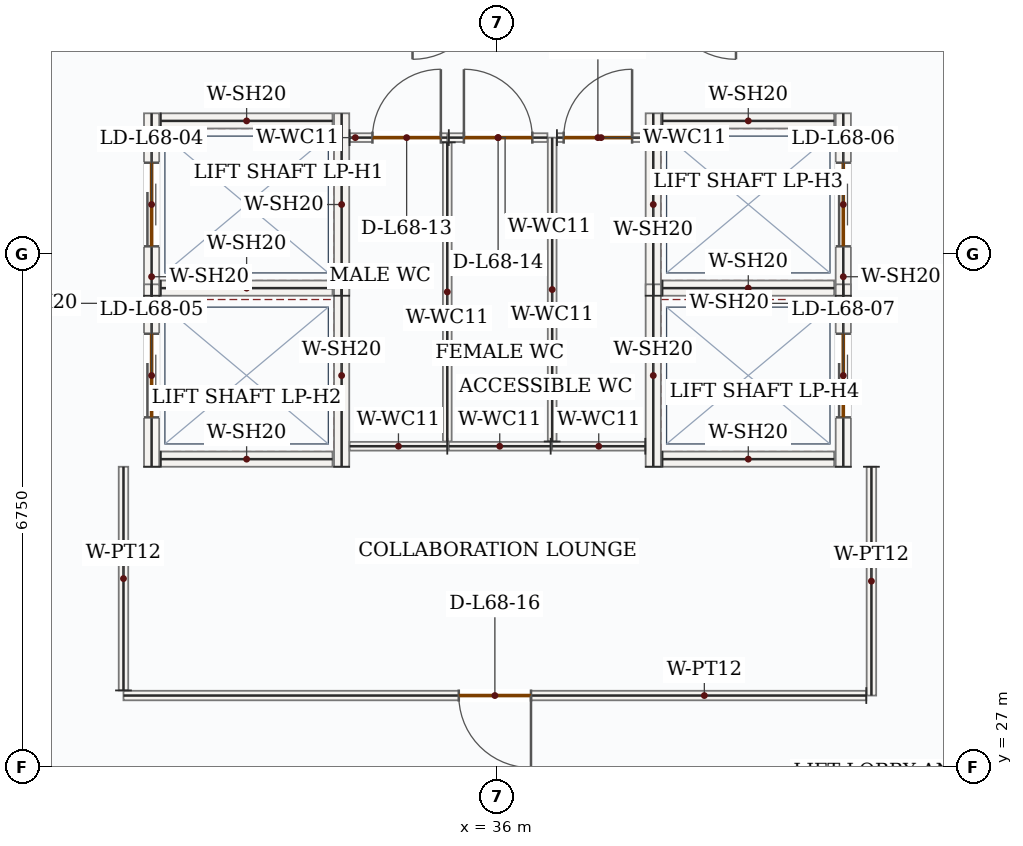
"""IFC4 building model, lengths in metres.
Left out: names, types, materials, properties, quantities, classifications, styles, units other than length and angle.
Written with IfcOpenShell. Run it as: python <this file> out.ifc"""

import sys

from ifc_helpers import new_model, si_unit, direction, frame, frame_2d, origin, place, context, subcontext, project, spatial, rectangle, extrude, source, transform, mapped, element, fill, save


model = new_model("IFC4")
c1 = context("Model", 3, precision=1e-05, world=origin(), true_north=direction((0.0, 1.0)))
c2 = subcontext(c1, "Body", "Model", "MODEL_VIEW")
j1 = project(units=[si_unit("LENGTHUNIT", "METRE"), si_unit("PLANEANGLEUNIT", "RADIAN")], contexts=[c1])
p1 = place(None, origin())
s1 = spatial("IfcSite", under=j1, at=p1, CompositionType="ELEMENT")
p2 = place(p1, origin())
s2 = spatial("IfcBuilding", under=s1, at=p2, CompositionType="ELEMENT")
p3 = place(p2, frame((0.0, 0.0, 284.1)))
s3 = spatial("IfcBuildingStorey", under=s2, at=p3, CompositionType="ELEMENT", Elevation=284.1)
p4 = place(p3, frame((31.45, 33.2, 0.0), z_axis=(0.0, 0.0, 1.0), x_axis=(0.0, 1.0, 0.0)))
e1 = element("IfcWall", 1, at=p4, inside=s3, PredefinedType="SOLIDWALL", context=c2, shape_type="SweptSolid", body=[
    extrude(rectangle(XDim=2.4, YDim=0.2, at=frame_2d((1.2, 0.0))), origin(), (0.0, 0.0, 1.0), 3.5),
])
p5 = place(p4, frame((0.65, 0.0, 0.0)))
e2 = element("IfcOpeningElement", 2, at=p5, cuts=e1, PredefinedType="OPENING", context=c2, shape_type="SweptSolid", body=[
    extrude(rectangle(XDim=1.1, YDim=2.15, at=frame_2d((0.55, 1.075))), frame((0.0, 0.11, 0.0), z_axis=(0.0, -1.0, 0.0), x_axis=(1.0, 0.0, 0.0)), (0.0, 0.0, 1.0), 0.22),
])
m1 = source(origin(), c2, "Body", "SweptSolid", [
    extrude(rectangle(XDim=2.4, YDim=0.2, at=frame_2d((1.2, 0.0))), origin(), (0.0, 0.0, 1.0), 3.5),
])
p6 = place(p3, frame((33.95, 33.2, 0.0), z_axis=(0.0, 0.0, 1.0), x_axis=(0.0, 1.0, 0.0)))
e3 = element("IfcWall", 3, at=p6, inside=s3, PredefinedType="SOLIDWALL", context=c2, shape_type="MappedRepresentation", body=[
    mapped(m1, transform((0.0, 0.0, 0.0), x_axis=(1.0, 0.0, 0.0), y_axis=(0.0, 1.0, 0.0), z_axis=(0.0, 0.0, 1.0), scale=1.0)),
])
m2 = source(origin(), c2, "Body", "SweptSolid", [
    extrude(rectangle(XDim=2.26, YDim=0.2, at=frame_2d((1.13, 0.0))), origin(), (0.0, 0.0, 1.0), 3.5),
])
for number, where, z_axis, x_axis in (
    (4, (31.57, 33.3, 0.0), (0.0, 0.0, 1.0), (1.0, 0.0, 0.0)),
    (5, (31.57, 35.5, 0.0), (0.0, 0.0, 1.0), (1.0, 0.0, 0.0)),
):
    element("IfcWall", number, at=place(p3, frame(where, z_axis=z_axis, x_axis=x_axis)), inside=s3, PredefinedType="SOLIDWALL", context=c2, shape_type="MappedRepresentation", body=[
        mapped(m2, transform((0.0, 0.0, 0.0), x_axis=(1.0, 0.0, 0.0), y_axis=(0.0, 1.0, 0.0), z_axis=(0.0, 0.0, 1.0), scale=1.0)),
    ])
p7 = place(p3, frame((31.45, 30.95, 0.0), z_axis=(0.0, 0.0, 1.0), x_axis=(0.0, 1.0, 0.0)))
e6 = element("IfcWall", 6, at=p7, inside=s3, PredefinedType="SOLIDWALL", context=c2, shape_type="SweptSolid", body=[
    extrude(rectangle(XDim=2.4, YDim=0.2, at=frame_2d((1.2, 0.0))), origin(), (0.0, 0.0, 1.0), 3.5),
])
p8 = place(p7, frame((0.65, 0.0, 0.0)))
e7 = element("IfcOpeningElement", 7, at=p8, cuts=e6, PredefinedType="OPENING", context=c2, shape_type="SweptSolid", body=[
    extrude(rectangle(XDim=1.1, YDim=2.15, at=frame_2d((0.55, 1.075))), frame((0.0, 0.11, 0.0), z_axis=(0.0, -1.0, 0.0), x_axis=(1.0, 0.0, 0.0)), (0.0, 0.0, 1.0), 0.22),
])
p9 = place(p3, frame((33.95, 30.95, 0.0), z_axis=(0.0, 0.0, 1.0), x_axis=(0.0, 1.0, 0.0)))
e8 = element("IfcWall", 8, at=p9, inside=s3, PredefinedType="SOLIDWALL", context=c2, shape_type="MappedRepresentation", body=[
    mapped(m1, transform((0.0, 0.0, 0.0), x_axis=(1.0, 0.0, 0.0), y_axis=(0.0, 1.0, 0.0), z_axis=(0.0, 0.0, 1.0), scale=1.0)),
])
p10 = place(p3, frame((31.57, 31.05, 0.0), z_axis=(0.0, 0.0, 1.0), x_axis=(1.0, 0.0, 0.0)))
e9 = element("IfcWall", 9, at=p10, inside=s3, PredefinedType="SOLIDWALL", context=c2, shape_type="MappedRepresentation", body=[
    mapped(m2, transform((0.0, 0.0, 0.0), x_axis=(1.0, 0.0, 0.0), y_axis=(0.0, 1.0, 0.0), z_axis=(0.0, 0.0, 1.0), scale=1.0)),
])
p11 = place(p3, frame((38.05, 33.2, 0.0), z_axis=(0.0, 0.0, 1.0), x_axis=(0.0, 1.0, 0.0)))
e10 = element("IfcWall", 10, at=p11, inside=s3, PredefinedType="SOLIDWALL", context=c2, shape_type="MappedRepresentation", body=[
    mapped(m1, transform((0.0, 0.0, 0.0), x_axis=(1.0, 0.0, 0.0), y_axis=(0.0, 1.0, 0.0), z_axis=(0.0, 0.0, 1.0), scale=1.0)),
])
p12 = place(p3, frame((40.55, 33.2, 0.0), z_axis=(0.0, 0.0, 1.0), x_axis=(0.0, 1.0, 0.0)))
e11 = element("IfcWall", 11, at=p12, inside=s3, PredefinedType="SOLIDWALL", context=c2, shape_type="SweptSolid", body=[
    extrude(rectangle(XDim=2.4, YDim=0.2, at=frame_2d((1.2, 0.0))), origin(), (0.0, 0.0, 1.0), 3.5),
])
p13 = place(p12, frame((0.65, 0.0, 0.0)))
e12 = element("IfcOpeningElement", 12, at=p13, cuts=e11, PredefinedType="OPENING", context=c2, shape_type="SweptSolid", body=[
    extrude(rectangle(XDim=1.1, YDim=2.15, at=frame_2d((0.55, 1.075))), frame((0.0, 0.11, 0.0), z_axis=(0.0, -1.0, 0.0), x_axis=(1.0, 0.0, 0.0)), (0.0, 0.0, 1.0), 0.22),
])
for number, where, z_axis, x_axis in (
    (13, (38.17, 33.3, 0.0), (0.0, 0.0, 1.0), (1.0, 0.0, 0.0)),
    (14, (38.17, 35.5, 0.0), (0.0, 0.0, 1.0), (1.0, 0.0, 0.0)),
):
    element("IfcWall", number, at=place(p3, frame(where, z_axis=z_axis, x_axis=x_axis)), inside=s3, PredefinedType="SOLIDWALL", context=c2, shape_type="MappedRepresentation", body=[
        mapped(m2, transform((0.0, 0.0, 0.0), x_axis=(1.0, 0.0, 0.0), y_axis=(0.0, 1.0, 0.0), z_axis=(0.0, 0.0, 1.0), scale=1.0)),
    ])
p14 = place(p3, frame((38.05, 30.95, 0.0), z_axis=(0.0, 0.0, 1.0), x_axis=(0.0, 1.0, 0.0)))
e15 = element("IfcWall", 15, at=p14, inside=s3, PredefinedType="SOLIDWALL", context=c2, shape_type="MappedRepresentation", body=[
    mapped(m1, transform((0.0, 0.0, 0.0), x_axis=(1.0, 0.0, 0.0), y_axis=(0.0, 1.0, 0.0), z_axis=(0.0, 0.0, 1.0), scale=1.0)),
])
p15 = place(p3, frame((40.55, 30.95, 0.0), z_axis=(0.0, 0.0, 1.0), x_axis=(0.0, 1.0, 0.0)))
e16 = element("IfcWall", 16, at=p15, inside=s3, PredefinedType="SOLIDWALL", context=c2, shape_type="SweptSolid", body=[
    extrude(rectangle(XDim=2.4, YDim=0.2, at=frame_2d((1.2, 0.0))), origin(), (0.0, 0.0, 1.0), 3.5),
])
p16 = place(p15, frame((0.65, 0.0, 0.0)))
e17 = element("IfcOpeningElement", 17, at=p16, cuts=e16, PredefinedType="OPENING", context=c2, shape_type="SweptSolid", body=[
    extrude(rectangle(XDim=1.1, YDim=2.15, at=frame_2d((0.55, 1.075))), frame((0.0, 0.11, 0.0), z_axis=(0.0, -1.0, 0.0), x_axis=(1.0, 0.0, 0.0)), (0.0, 0.0, 1.0), 0.22),
])
p17 = place(p3, frame((38.17, 31.05, 0.0), z_axis=(0.0, 0.0, 1.0), x_axis=(1.0, 0.0, 0.0)))
e18 = element("IfcWall", 18, at=p17, inside=s3, PredefinedType="SOLIDWALL", context=c2, shape_type="MappedRepresentation", body=[
    mapped(m2, transform((0.0, 0.0, 0.0), x_axis=(1.0, 0.0, 0.0), y_axis=(0.0, 1.0, 0.0), z_axis=(0.0, 0.0, 1.0), scale=1.0)),
])
m3 = source(origin(), c2, "Body", "SweptSolid", [
    extrude(rectangle(XDim=1.225, YDim=0.115, at=frame_2d((0.613, 0.0))), origin(), (0.0, 0.0, 1.0), 3.5),
])
p18 = place(p3, frame((37.945, 31.22, 0.0), z_axis=(0.0, 0.0, 1.0), x_axis=(-1.0, 0.0, 0.0)))
e19 = element("IfcWall", 19, at=p18, inside=s3, PredefinedType="PARTITIONING", context=c2, shape_type="MappedRepresentation", body=[
    mapped(m3, transform((0.0, 0.0, 0.0), x_axis=(1.0, 0.0, 0.0), y_axis=(0.0, 1.0, 0.0), z_axis=(0.0, 0.0, 1.0), scale=1.0)),
])
m4 = source(origin(), c2, "Body", "SweptSolid", [
    extrude(rectangle(XDim=3.998, YDim=0.115, at=frame_2d((1.999, 0.0))), origin(), (0.0, 0.0, 1.0), 3.5),
])
p19 = place(p3, frame((36.72, 31.282, 0.0), z_axis=(0.0, 0.0, 1.0), x_axis=(0.0, 1.0, 0.0)))
e20 = element("IfcWall", 20, at=p19, inside=s3, PredefinedType="PARTITIONING", context=c2, shape_type="MappedRepresentation", body=[
    mapped(m4, transform((0.0, 0.0, 0.0), x_axis=(1.0, 0.0, 0.0), y_axis=(0.0, 1.0, 0.0), z_axis=(0.0, 0.0, 1.0), scale=1.0)),
])
p20 = place(p3, frame((36.782, 35.28, 0.0), z_axis=(0.0, 0.0, 1.0), x_axis=(1.0, 0.0, 0.0)))
e21 = element("IfcWall", 21, at=p20, inside=s3, PredefinedType="PARTITIONING", context=c2, shape_type="SweptSolid", body=[
    extrude(rectangle(XDim=1.163, YDim=0.115, at=frame_2d((0.581, 0.0))), origin(), (0.0, 0.0, 1.0), 3.5),
])
p21 = place(p20, frame((0.089, 0.0, 0.0)))
e22 = element("IfcOpeningElement", 22, at=p21, cuts=e21, PredefinedType="OPENING", context=c2, shape_type="SweptSolid", body=[
    extrude(rectangle(XDim=0.9, YDim=2.1, at=frame_2d((0.45, 1.05))), frame((0.0, 0.067, 0.0), z_axis=(0.0, -1.0, 0.0), x_axis=(1.0, 0.0, 0.0)), (0.0, 0.0, 1.0), 0.135),
])
m5 = source(origin(), c2, "Body", "SweptSolid", [
    extrude(rectangle(XDim=1.285, YDim=0.115, at=frame_2d((0.643, 0.0))), origin(), (0.0, 0.0, 1.0), 3.5),
])
p22 = place(p3, frame((35.34, 31.22, 0.0), z_axis=(0.0, 0.0, 1.0), x_axis=(-1.0, 0.0, 0.0)))
e23 = element("IfcWall", 23, at=p22, inside=s3, PredefinedType="PARTITIONING", context=c2, shape_type="MappedRepresentation", body=[
    mapped(m5, transform((0.0, 0.0, 0.0), x_axis=(1.0, 0.0, 0.0), y_axis=(0.0, 1.0, 0.0), z_axis=(0.0, 0.0, 1.0), scale=1.0)),
])
p23 = place(p3, frame((34.055, 35.28, 0.0), z_axis=(0.0, 0.0, 1.0), x_axis=(1.0, 0.0, 0.0)))
e24 = element("IfcWall", 24, at=p23, inside=s3, PredefinedType="PARTITIONING", context=c2, shape_type="SweptSolid", body=[
    extrude(rectangle(XDim=1.285, YDim=0.115, at=frame_2d((0.643, 0.0))), origin(), (0.0, 0.0, 1.0), 3.5),
])
p24 = place(p23, frame((0.3, 0.0, 0.0)))
e25 = element("IfcOpeningElement", 25, at=p24, cuts=e24, PredefinedType="OPENING", context=c2, shape_type="SweptSolid", body=[
    extrude(rectangle(XDim=0.9, YDim=2.1, at=frame_2d((0.45, 1.05))), frame((0.0, 0.067, 0.0), z_axis=(0.0, -1.0, 0.0), x_axis=(1.0, 0.0, 0.0)), (0.0, 0.0, 1.0), 0.135),
])
m6 = source(origin(), c2, "Body", "SweptSolid", [
    extrude(rectangle(XDim=3.935, YDim=0.115, at=frame_2d((1.968, 0.0))), origin(), (0.0, 0.0, 1.0), 3.5),
])
p25 = place(p3, frame((35.34, 35.218, 0.0), z_axis=(0.0, 0.0, 1.0), x_axis=(0.0, -1.0, 0.0)))
e26 = element("IfcWall", 26, at=p25, inside=s3, PredefinedType="PARTITIONING", context=c2, shape_type="MappedRepresentation", body=[
    mapped(m6, transform((0.0, 0.0, 0.0), x_axis=(1.0, 0.0, 0.0), y_axis=(0.0, 1.0, 0.0), z_axis=(0.0, 0.0, 1.0), scale=1.0)),
])
m7 = source(origin(), c2, "Body", "SweptSolid", [
    extrude(rectangle(XDim=1.34, YDim=0.115, at=frame_2d((0.67, 0.0))), origin(), (0.0, 0.0, 1.0), 3.5),
])
p26 = place(p3, frame((36.7, 31.22, 0.0), z_axis=(0.0, 0.0, 1.0), x_axis=(-1.0, 0.0, 0.0)))
e27 = element("IfcWall", 27, at=p26, inside=s3, PredefinedType="PARTITIONING", context=c2, shape_type="MappedRepresentation", body=[
    mapped(m7, transform((0.0, 0.0, 0.0), x_axis=(1.0, 0.0, 0.0), y_axis=(0.0, 1.0, 0.0), z_axis=(0.0, 0.0, 1.0), scale=1.0)),
])
p27 = place(p3, frame((35.36, 35.28, 0.0), z_axis=(0.0, 0.0, 1.0), x_axis=(1.0, 0.0, 0.0)))
e28 = element("IfcWall", 28, at=p27, inside=s3, PredefinedType="PARTITIONING", context=c2, shape_type="SweptSolid", body=[
    extrude(rectangle(XDim=1.297, YDim=0.115, at=frame_2d((0.649, 0.0))), origin(), (0.0, 0.0, 1.0), 3.5),
])
p28 = place(p27, frame((0.199, 0.0, 0.0)))
e29 = element("IfcOpeningElement", 29, at=p28, cuts=e28, PredefinedType="OPENING", context=c2, shape_type="SweptSolid", body=[
    extrude(rectangle(XDim=0.9, YDim=2.1, at=frame_2d((0.45, 1.05))), frame((0.0, 0.067, 0.0), z_axis=(0.0, -1.0, 0.0), x_axis=(1.0, 0.0, 0.0)), (0.0, 0.0, 1.0), 0.135),
])
m8 = source(origin(), c2, "Body", "SweptSolid", [
    extrude(rectangle(XDim=3.01, YDim=0.125, at=frame_2d((1.505, 0.0))), origin(), (0.0, 0.0, 1.0), 3.5),
])
p29 = place(p3, frame((40.92, 30.95, 0.0), z_axis=(0.0, 0.0, 1.0), x_axis=(0.0, -1.0, 0.0)))
e30 = element("IfcWall", 30, at=p29, inside=s3, PredefinedType="PARTITIONING", context=c2, shape_type="MappedRepresentation", body=[
    mapped(m8, transform((0.0, 0.0, 0.0), x_axis=(1.0, 0.0, 0.0), y_axis=(0.0, 1.0, 0.0), z_axis=(0.0, 0.0, 1.0), scale=1.0)),
])
p30 = place(p3, frame((40.853, 27.94, 0.0), z_axis=(0.0, 0.0, 1.0), x_axis=(-1.0, 0.0, 0.0)))
e31 = element("IfcWall", 31, at=p30, inside=s3, PredefinedType="PARTITIONING", context=c2, shape_type="SweptSolid", body=[
    extrude(rectangle(XDim=9.772, YDim=0.125, at=frame_2d((4.886, 0.0))), origin(), (0.0, 0.0, 1.0), 3.5),
])
p31 = place(p30, frame((4.411, 0.0, 0.0)))
e32 = element("IfcOpeningElement", 32, at=p31, cuts=e31, PredefinedType="OPENING", context=c2, shape_type="SweptSolid", body=[
    extrude(rectangle(XDim=0.95, YDim=2.15, at=frame_2d((0.475, 1.075))), frame((0.0, 0.073, 0.0), z_axis=(0.0, -1.0, 0.0), x_axis=(1.0, 0.0, 0.0)), (0.0, 0.0, 1.0), 0.145),
])
m9 = source(origin(), c2, "Body", "SweptSolid", [
    extrude(rectangle(XDim=2.942, YDim=0.125, at=frame_2d((1.471, 0.0))), origin(), (0.0, 0.0, 1.0), 3.5),
])
p32 = place(p3, frame((31.08, 28.008, 0.0), z_axis=(0.0, 0.0, 1.0), x_axis=(0.0, 1.0, 0.0)))
e33 = element("IfcWall", 33, at=p32, inside=s3, PredefinedType="PARTITIONING", context=c2, shape_type="MappedRepresentation", body=[
    mapped(m9, transform((0.0, 0.0, 0.0), x_axis=(1.0, 0.0, 0.0), y_axis=(0.0, 1.0, 0.0), z_axis=(0.0, 0.0, 1.0), scale=1.0)),
])
m10 = source(origin(), c2, "Body", "SweptSolid", [
    extrude(rectangle(XDim=1.1, YDim=2.15, at=frame_2d((0.55, 1.075))), frame((0.0, 0.025, 0.0), z_axis=(0.0, -1.0, 0.0), x_axis=(1.0, 0.0, 0.0)), (0.0, 0.0, 1.0), 0.05),
])
p33 = place(p5, origin())
e34 = element("IfcDoor", 34, at=p33, inside=s3, OperationType="DOUBLE_DOOR_SLIDING", PredefinedType="DOOR", context=c2, shape_type="MappedRepresentation", body=[
    mapped(m10, transform((0.0, 0.0, 0.0), x_axis=(1.0, 0.0, 0.0), y_axis=(0.0, 1.0, 0.0), z_axis=(0.0, 0.0, 1.0), scale=1.0)),
])
fill(e2, e34)
p34 = place(p8, origin())
e35 = element("IfcDoor", 35, at=p34, inside=s3, OperationType="DOUBLE_DOOR_SLIDING", PredefinedType="DOOR", context=c2, shape_type="MappedRepresentation", body=[
    mapped(m10, transform((0.0, 0.0, 0.0), x_axis=(1.0, 0.0, 0.0), y_axis=(0.0, 1.0, 0.0), z_axis=(0.0, 0.0, 1.0), scale=1.0)),
])
fill(e7, e35)
p35 = place(p13, origin())
e36 = element("IfcDoor", 36, at=p35, inside=s3, OperationType="DOUBLE_DOOR_SLIDING", PredefinedType="DOOR", context=c2, shape_type="MappedRepresentation", body=[
    mapped(m10, transform((0.0, 0.0, 0.0), x_axis=(1.0, 0.0, 0.0), y_axis=(0.0, 1.0, 0.0), z_axis=(0.0, 0.0, 1.0), scale=1.0)),
])
fill(e12, e36)
p36 = place(p16, origin())
e37 = element("IfcDoor", 37, at=p36, inside=s3, OperationType="DOUBLE_DOOR_SLIDING", PredefinedType="DOOR", context=c2, shape_type="MappedRepresentation", body=[
    mapped(m10, transform((0.0, 0.0, 0.0), x_axis=(1.0, 0.0, 0.0), y_axis=(0.0, 1.0, 0.0), z_axis=(0.0, 0.0, 1.0), scale=1.0)),
])
fill(e17, e37)
m11 = source(origin(), c2, "Body", "SweptSolid", [
    extrude(rectangle(XDim=0.9, YDim=2.1, at=frame_2d((0.45, 1.05))), frame((0.0, 0.025, 0.0), z_axis=(0.0, -1.0, 0.0), x_axis=(1.0, 0.0, 0.0)), (0.0, 0.0, 1.0), 0.05),
])
p37 = place(p24, origin())
e38 = element("IfcDoor", 38, at=p37, inside=s3, OperationType="SINGLE_SWING_RIGHT", PredefinedType="DOOR", context=c2, shape_type="MappedRepresentation", body=[
    mapped(m11, transform((0.0, 0.0, 0.0), x_axis=(1.0, 0.0, 0.0), y_axis=(0.0, 1.0, 0.0), z_axis=(0.0, 0.0, 1.0), scale=1.0)),
])
fill(e25, e38)
p38 = place(p28, origin())
e39 = element("IfcDoor", 39, at=p38, inside=s3, OperationType="SINGLE_SWING_LEFT", PredefinedType="DOOR", context=c2, shape_type="MappedRepresentation", body=[
    mapped(m11, transform((0.0, 0.0, 0.0), x_axis=(1.0, 0.0, 0.0), y_axis=(0.0, 1.0, 0.0), z_axis=(0.0, 0.0, 1.0), scale=1.0)),
])
fill(e29, e39)
p39 = place(p21, origin())
e40 = element("IfcDoor", 40, at=p39, inside=s3, OperationType="SINGLE_SWING_RIGHT", PredefinedType="DOOR", context=c2, shape_type="MappedRepresentation", body=[
    mapped(m11, transform((0.0, 0.0, 0.0), x_axis=(1.0, 0.0, 0.0), y_axis=(0.0, 1.0, 0.0), z_axis=(0.0, 0.0, 1.0), scale=1.0)),
])
fill(e22, e40)
m12 = source(origin(), c2, "Body", "SweptSolid", [
    extrude(rectangle(XDim=0.95, YDim=2.15, at=frame_2d((0.475, 1.075))), frame((0.0, 0.025, 0.0), z_axis=(0.0, -1.0, 0.0), x_axis=(1.0, 0.0, 0.0)), (0.0, 0.0, 1.0), 0.05),
])
p40 = place(p31, origin())
e41 = element("IfcDoor", 41, at=p40, inside=s3, OperationType="SINGLE_SWING_LEFT", PredefinedType="DOOR", context=c2, shape_type="MappedRepresentation", body=[
    mapped(m12, transform((0.0, 0.0, 0.0), x_axis=(1.0, 0.0, 0.0), y_axis=(0.0, 1.0, 0.0), z_axis=(0.0, 0.0, 1.0), scale=1.0)),
])
fill(e32, e41)
save(model, sys.argv[1])
